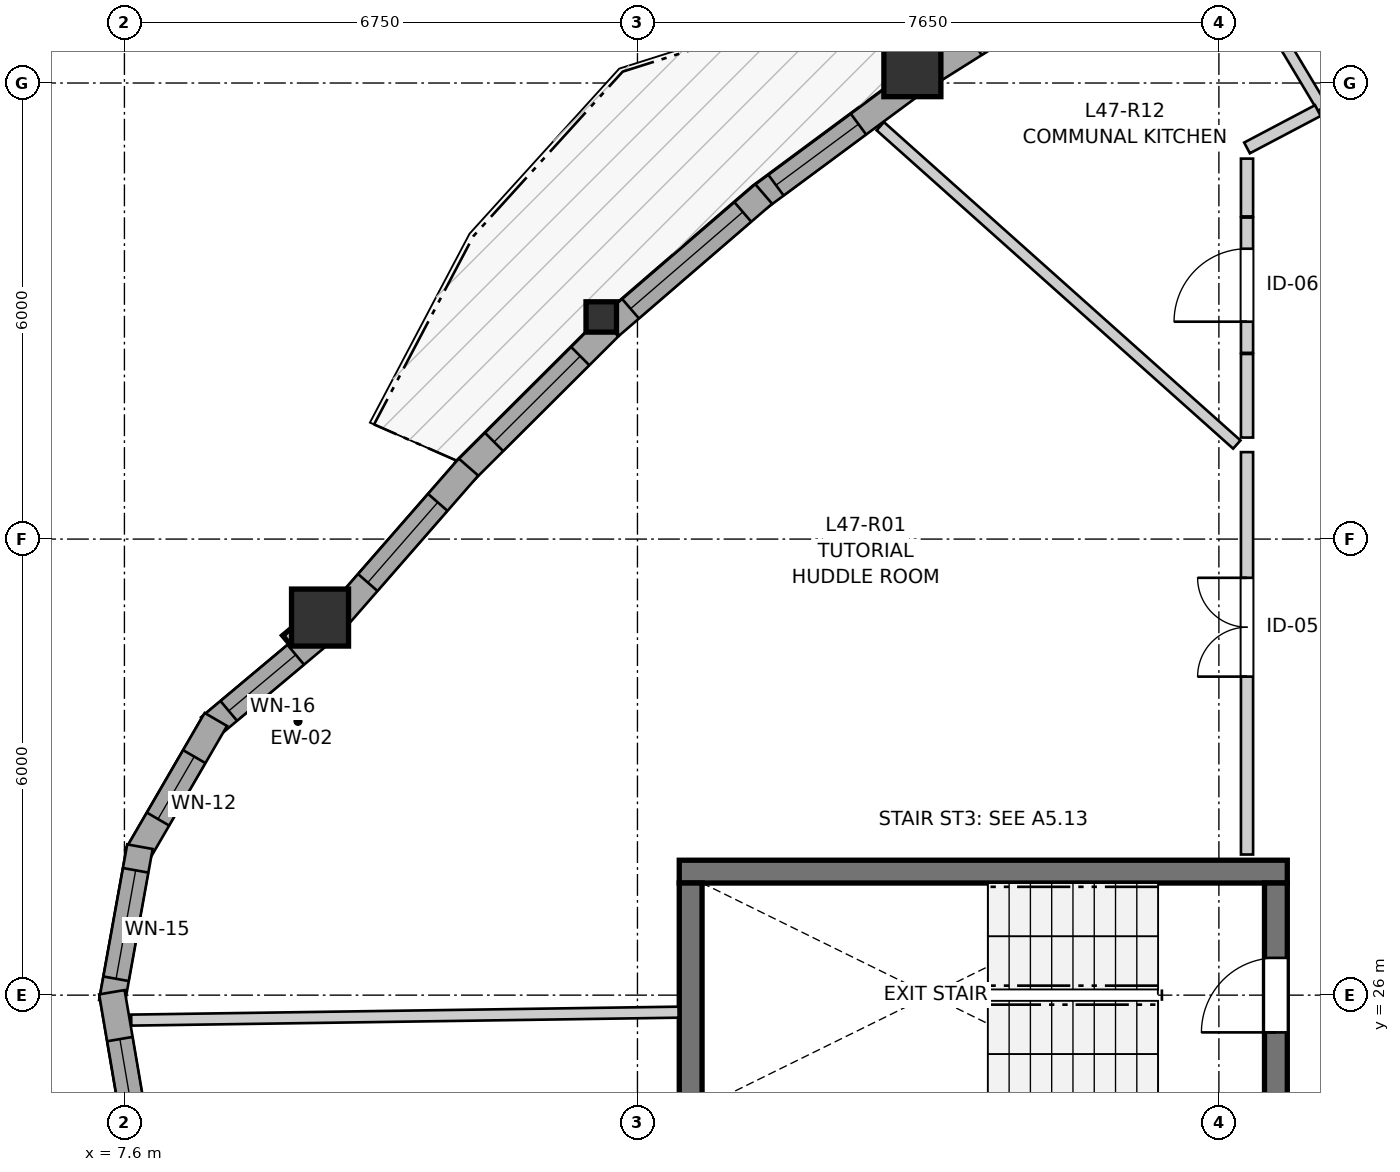
"""IFC4 building model, lengths in metres.
Left out: names, types, materials, properties, quantities, classifications, styles, units other than length and angle.
Written with IfcOpenShell. Run it as: python <this file> out.ifc"""

import sys

from ifc_helpers import new_model, si_unit, direction, frame, frame_2d, origin, origin_2d, place, context, subcontext, project, spatial, rectangle, i_section, extrude, source, transform, mapped, element, fill, save


model = new_model("IFC4")
c1 = context("Model", 3, precision=1e-05, world=origin(), true_north=direction((0.0, 1.0)))
c2 = subcontext(c1, "Body", "Model", "MODEL_VIEW")
j1 = project(units=[si_unit("LENGTHUNIT", "METRE"), si_unit("PLANEANGLEUNIT", "RADIAN")], contexts=[c1])
p1 = place(None, origin())
s1 = spatial("IfcSite", under=j1, at=p1, CompositionType="ELEMENT")
p2 = place(p1, origin())
s2 = spatial("IfcBuilding", under=s1, at=p2, CompositionType="ELEMENT")
p3 = place(p2, frame((0.0, 0.0, 158.6)))
s3 = spatial("IfcBuildingStorey", under=s2, at=p3, CompositionType="ELEMENT", Elevation=158.6)
p4 = place(p3, frame((22.9, 27.625, 0.0), z_axis=(0.0, 0.0, 1.0), x_axis=(-1.0, 0.0, 0.0)))
e1 = element("IfcWall", 1, at=p4, inside=s3, PredefinedType="SHEAR", context=c2, shape_type="SweptSolid", body=[
    extrude(rectangle(XDim=8.0, YDim=0.3, at=frame_2d((4.0, 0.0))), origin(), (0.0, 0.0, 1.0), 2.95),
])
p5 = place(p3, frame((15.05, 27.475, 0.0), z_axis=(0.0, 0.0, 1.0), x_axis=(0.0, -1.0, 0.0)))
e2 = element("IfcWall", 2, at=p5, inside=s3, PredefinedType="SHEAR", context=c2, shape_type="SweptSolid", body=[
    extrude(rectangle(XDim=2.95, YDim=0.3, at=frame_2d((1.475, 0.0))), origin(), (0.0, 0.0, 1.0), 2.95),
])
p6 = place(p3, frame((22.75, 24.525, 0.0), z_axis=(0.0, 0.0, 1.0), x_axis=(0.0, 1.0, 0.0)))
e3 = element("IfcWall", 3, at=p6, inside=s3, PredefinedType="SHEAR", context=c2, shape_type="SweptSolid", body=[
    extrude(rectangle(XDim=2.95, YDim=0.3, at=frame_2d((1.475, 0.0))), origin(), (0.0, 0.0, 1.0), 2.95),
])
p7 = place(p6, frame((0.985, 0.0, 0.0)))
e4 = element("IfcOpeningElement", 4, at=p7, cuts=e3, PredefinedType="OPENING", context=c2, shape_type="SweptSolid", body=[
    extrude(rectangle(XDim=0.98, YDim=2.15, at=frame_2d((0.49, 1.075))), frame((0.0, 0.16, 0.0), z_axis=(0.0, -1.0, 0.0), x_axis=(1.0, 0.0, 0.0)), (0.0, 0.0, 1.0), 0.32),
])
m1 = source(origin(), c2, "Body", "SweptSolid", [
    extrude(rectangle(XDim=0.75, YDim=0.75, at=origin_2d()), origin(), (0.0, 0.0, 1.0), 2.95),
])
for number, where, z_axis, x_axis in (
    (5, (10.174, 30.967, 0.0), (0.0, 0.0, 1.0), (1.0, 0.0, 0.0)),
    (6, (17.967, 38.195, 0.0), (0.0, 0.0, 1.0), (1.0, 0.0, 0.0)),
):
    element("IfcColumn", number, at=place(p3, frame(where, z_axis=z_axis, x_axis=x_axis)), inside=s3, PredefinedType="COLUMN", context=c2, shape_type="MappedRepresentation", body=[
        mapped(m1, transform((0.0, 0.0, 0.0), x_axis=(1.0, 0.0, 0.0), y_axis=(0.0, 1.0, 0.0), z_axis=(0.0, 0.0, 1.0), scale=1.0)),
    ])
m2 = source(origin(), c2, "Body", "SweptSolid", [
    extrude(i_section(OverallWidth=0.401, OverallDepth=0.399, WebThickness=0.023, FlangeThickness=0.036, FilletRadius=0.015, at=origin_2d()), origin(), (0.0, 0.0, 1.0), 2.95),
])
p8 = place(p3, frame((13.874, 34.922, 0.0), z_axis=(0.0, 0.0, 1.0), x_axis=(1.0, 0.0, 0.0)))
e7 = element("IfcColumn", 7, at=p8, inside=s3, PredefinedType="PILASTER", context=c2, shape_type="MappedRepresentation", body=[
    mapped(m2, transform((0.0, 0.0, 0.0), x_axis=(1.0, 0.0, 0.0), y_axis=(0.0, 1.0, 0.0), z_axis=(0.0, 0.0, 1.0), scale=1.0)),
])
p9 = place(p3, frame((10.164, 30.738, 0.0), z_axis=(0.0, 0.0, 1.0), x_axis=(-0.766501557267, -0.64224244854, 0.0)))
e8 = element("IfcWall", 8, at=p9, inside=s3, PredefinedType="SOLIDWALL", context=c2, shape_type="SweptSolid", body=[
    extrude(rectangle(XDim=1.888, YDim=0.34, at=frame_2d((0.944, 0.0))), origin(), (0.0, 0.0, 1.0), 2.53),
])
p10 = place(p9, frame((0.404, 0.0, 0.82)))
e9 = element("IfcOpeningElement", 9, at=p10, cuts=e8, PredefinedType="OPENING", context=c2, shape_type="SweptSolid", body=[
    extrude(rectangle(XDim=1.15, YDim=1.2, at=frame_2d((0.575, 0.6))), frame((0.0, 0.18, 0.0), z_axis=(0.0, -1.0, 0.0), x_axis=(1.0, 0.0, 0.0)), (0.0, 0.0, 1.0), 0.36),
])
p11 = place(p3, frame((8.803, 29.627, 0.0), z_axis=(0.0, 0.0, 1.0), x_axis=(-0.502090235641, -0.864815237651, 0.0)))
e10 = element("IfcWall", 10, at=p11, inside=s3, PredefinedType="SOLIDWALL", context=c2, shape_type="SweptSolid", body=[
    extrude(rectangle(XDim=2.081, YDim=0.34, at=frame_2d((1.041, 0.0))), origin(), (0.0, 0.0, 1.0), 2.53),
])
p12 = place(p11, frame((0.565, 0.0, 0.82)))
e11 = element("IfcOpeningElement", 11, at=p12, cuts=e10, PredefinedType="OPENING", context=c2, shape_type="SweptSolid", body=[
    extrude(rectangle(XDim=0.95, YDim=1.35, at=frame_2d((0.475, 0.675))), frame((0.0, 0.18, 0.0), z_axis=(0.0, -1.0, 0.0), x_axis=(1.0, 0.0, 0.0)), (0.0, 0.0, 1.0), 0.36),
])
p13 = place(p3, frame((7.804, 27.953, 0.0), z_axis=(0.0, 0.0, 1.0), x_axis=(-0.177605215389, -0.984101817632, 0.0)))
e12 = element("IfcWall", 12, at=p13, inside=s3, PredefinedType="SOLIDWALL", context=c2, shape_type="SweptSolid", body=[
    extrude(rectangle(XDim=2.081, YDim=0.34, at=frame_2d((1.041, 0.0))), origin(), (0.0, 0.0, 1.0), 2.53),
])
p14 = place(p13, frame((0.316, 0.0, 0.82)))
e13 = element("IfcOpeningElement", 13, at=p14, cuts=e12, PredefinedType="OPENING", context=c2, shape_type="SweptSolid", body=[
    extrude(rectangle(XDim=1.45, YDim=1.25, at=frame_2d((0.725, 0.625))), frame((0.0, 0.18, 0.0), z_axis=(0.0, -1.0, 0.0), x_axis=(1.0, 0.0, 0.0)), (0.0, 0.0, 1.0), 0.36),
])
p15 = place(p3, frame((7.435, 26.038, 0.0), z_axis=(0.0, 0.0, 1.0), x_axis=(0.168107405166, -0.985768685001, 0.0)))
e14 = element("IfcWall", 14, at=p15, inside=s3, PredefinedType="SOLIDWALL", context=c2, shape_type="SweptSolid", body=[
    extrude(rectangle(XDim=2.081, YDim=0.34, at=frame_2d((1.041, 0.0))), origin(), (0.0, 0.0, 1.0), 2.53),
])
p16 = place(p15, frame((0.625, 0.0, 0.82)))
e15 = element("IfcOpeningElement", 15, at=p16, cuts=e14, PredefinedType="OPENING", context=c2, shape_type="SweptSolid", body=[
    extrude(rectangle(XDim=1.15, YDim=1.2, at=frame_2d((0.575, 0.6))), frame((0.0, 0.18, 0.0), z_axis=(0.0, -1.0, 0.0), x_axis=(1.0, 0.0, 0.0)), (0.0, 0.0, 1.0), 0.36),
])
p17 = place(p3, frame((20.284, 39.452, 0.0), z_axis=(0.0, 0.0, 1.0), x_axis=(-0.846415587119, -0.532522913951, 0.0)))
e16 = element("IfcWall", 16, at=p17, inside=s3, PredefinedType="SOLIDWALL", context=c2, shape_type="SweptSolid", body=[
    extrude(rectangle(XDim=2.476, YDim=0.34, at=frame_2d((1.238, 0.0))), origin(), (0.0, 0.0, 1.0), 2.53),
])
p18 = place(p17, frame((0.718, 0.0, 0.82)))
e17 = element("IfcOpeningElement", 17, at=p18, cuts=e16, PredefinedType="OPENING", context=c2, shape_type="SweptSolid", body=[
    extrude(rectangle(XDim=1.05, YDim=1.45, at=frame_2d((0.525, 0.725))), frame((0.0, 0.18, 0.0), z_axis=(0.0, -1.0, 0.0), x_axis=(1.0, 0.0, 0.0)), (0.0, 0.0, 1.0), 0.36),
])
p19 = place(p3, frame((17.944, 37.967, 0.0), z_axis=(0.0, 0.0, 1.0), x_axis=(-0.803795025682, -0.594906342788, 0.0)))
e18 = element("IfcWall", 18, at=p19, inside=s3, PredefinedType="SOLIDWALL", context=c2, shape_type="SweptSolid", body=[
    extrude(rectangle(XDim=2.491, YDim=0.34, at=frame_2d((1.245, 0.0))), origin(), (0.0, 0.0, 1.0), 2.53),
])
p20 = place(p19, frame((0.853, 0.0, 0.82)))
e19 = element("IfcOpeningElement", 19, at=p20, cuts=e18, PredefinedType="OPENING", context=c2, shape_type="SweptSolid", body=[
    extrude(rectangle(XDim=1.35, YDim=1.45, at=frame_2d((0.675, 0.725))), frame((0.0, 0.18, 0.0), z_axis=(0.0, -1.0, 0.0), x_axis=(1.0, 0.0, 0.0)), (0.0, 0.0, 1.0), 0.36),
])
p21 = place(p3, frame((16.011, 36.54, 0.0), z_axis=(0.0, 0.0, 1.0), x_axis=(-0.757442887734, -0.652901425807, 0.0)))
e20 = element("IfcWall", 20, at=p21, inside=s3, PredefinedType="SOLIDWALL", context=c2, shape_type="SweptSolid", body=[
    extrude(rectangle(XDim=2.655, YDim=0.34, at=frame_2d((1.328, 0.0))), origin(), (0.0, 0.0, 1.0), 2.53),
])
p22 = place(p21, frame((0.363, 0.0, 0.82)))
e21 = element("IfcOpeningElement", 21, at=p22, cuts=e20, PredefinedType="OPENING", context=c2, shape_type="SweptSolid", body=[
    extrude(rectangle(XDim=1.95, YDim=1.4, at=frame_2d((0.975, 0.7))), frame((0.0, 0.18, 0.0), z_axis=(0.0, -1.0, 0.0), x_axis=(1.0, 0.0, 0.0)), (0.0, 0.0, 1.0), 0.36),
])
p23 = place(p3, frame((13.979, 34.788, 0.0), z_axis=(0.0, 0.0, 1.0), x_axis=(-0.708417113386, -0.705794016312, 0.0)))
e22 = element("IfcWall", 22, at=p23, inside=s3, PredefinedType="SOLIDWALL", context=c2, shape_type="SweptSolid", body=[
    extrude(rectangle(XDim=2.699, YDim=0.34, at=frame_2d((1.35, 0.0))), origin(), (0.0, 0.0, 1.0), 2.53),
])
p24 = place(p23, frame((0.54, 0.0, 0.82)))
e23 = element("IfcOpeningElement", 23, at=p24, cuts=e22, PredefinedType="OPENING", context=c2, shape_type="SweptSolid", body=[
    extrude(rectangle(XDim=1.6, YDim=1.35, at=frame_2d((0.8, 0.675))), frame((0.0, 0.18, 0.0), z_axis=(0.0, -1.0, 0.0), x_axis=(1.0, 0.0, 0.0)), (0.0, 0.0, 1.0), 0.36),
])
p25 = place(p3, frame((12.127, 32.947, 0.0), z_axis=(0.0, 0.0, 1.0), x_axis=(-0.657607305641, -0.753360890655, 0.0)))
e24 = element("IfcWall", 24, at=p25, inside=s3, PredefinedType="SOLIDWALL", context=c2, shape_type="SweptSolid", body=[
    extrude(rectangle(XDim=2.621, YDim=0.34, at=frame_2d((1.311, 0.0))), origin(), (0.0, 0.0, 1.0), 2.53),
])
p26 = place(p25, frame((0.615, 0.0, 0.82)))
e25 = element("IfcOpeningElement", 25, at=p26, cuts=e24, PredefinedType="OPENING", context=c2, shape_type="SweptSolid", body=[
    extrude(rectangle(XDim=1.4, YDim=1.35, at=frame_2d((0.7, 0.675))), frame((0.0, 0.18, 0.0), z_axis=(0.0, -1.0, 0.0), x_axis=(1.0, 0.0, 0.0)), (0.0, 0.0, 1.0), 0.36),
])
p27 = place(p3, frame((22.37, 27.85, 0.0), z_axis=(0.0, 0.0, 1.0), x_axis=(0.0, 1.0, 0.0)))
e26 = element("IfcWall", 26, at=p27, inside=s3, PredefinedType="PARTITIONING", context=c2, shape_type="SweptSolid", body=[
    extrude(rectangle(XDim=5.294, YDim=0.16, at=frame_2d((2.647, 0.0))), origin(), (0.0, 0.0, 1.0), 2.95),
])
p28 = place(p27, frame((2.341, 0.0, 0.0)))
e27 = element("IfcOpeningElement", 27, at=p28, cuts=e26, PredefinedType="OPENING", context=c2, shape_type="SweptSolid", body=[
    extrude(rectangle(XDim=1.3, YDim=2.1, at=frame_2d((0.65, 1.05))), frame((0.0, 0.09, 0.0), z_axis=(0.0, -1.0, 0.0), x_axis=(1.0, 0.0, 0.0)), (0.0, 0.0, 1.0), 0.18),
])
p29 = place(p3, frame((22.37, 34.45, 0.0), z_axis=(0.0, 0.0, 1.0), x_axis=(0.0, 1.0, 0.0)))
e28 = element("IfcWall", 28, at=p29, inside=s3, PredefinedType="PARTITIONING", context=c2, shape_type="SweptSolid", body=[
    extrude(rectangle(XDim=1.78, YDim=0.16, at=frame_2d((0.89, 0.0))), origin(), (0.0, 0.0, 1.0), 2.95),
])
p30 = place(p29, frame((0.41, 0.0, 0.0)))
e29 = element("IfcOpeningElement", 29, at=p30, cuts=e28, PredefinedType="OPENING", context=c2, shape_type="SweptSolid", body=[
    extrude(rectangle(XDim=0.96, YDim=2.1, at=frame_2d((0.48, 1.05))), frame((0.0, 0.09, 0.0), z_axis=(0.0, -1.0, 0.0), x_axis=(1.0, 0.0, 0.0)), (0.0, 0.0, 1.0), 0.18),
])
p31 = place(p3, frame((7.689, 25.671, 0.0), z_axis=(0.0, 0.0, 1.0), x_axis=(0.999894747293, 0.014508422953, 0.0)))
e30 = element("IfcWall", 30, at=p31, inside=s3, PredefinedType="PARTITIONING", context=c2, shape_type="SweptSolid", body=[
    extrude(rectangle(XDim=7.202, YDim=0.145, at=frame_2d((3.601, 0.0))), origin(), (0.0, 0.0, 1.0), 2.95),
])
p32 = place(p3, frame((17.545, 37.432, 0.0), z_axis=(0.0, 0.0, 1.0), x_axis=(0.745965905636, -0.665984134668, 0.0)))
e31 = element("IfcWall", 31, at=p32, inside=s3, PredefinedType="PARTITIONING", context=c2, shape_type="SweptSolid", body=[
    extrude(rectangle(XDim=6.288, YDim=0.145, at=frame_2d((3.144, 0.0))), origin(), (0.0, 0.0, 1.0), 2.95),
])
p33 = place(p3, frame((21.908, 40.1, 0.0), z_axis=(0.0, 0.0, 1.0), x_axis=(0.513582752497, -0.85804006686, 0.0)))
e32 = element("IfcWall", 32, at=p33, inside=s3, PredefinedType="PARTITIONING", context=c2, shape_type="SweptSolid", body=[
    extrude(rectangle(XDim=2.832, YDim=0.145, at=frame_2d((1.416, 0.0))), origin(), (0.0, 0.0, 1.0), 2.95),
])
p34 = place(p3, frame((22.37, 33.336, 0.0), z_axis=(0.0, 0.0, 1.0), x_axis=(0.0, 1.0, 0.0)))
e33 = element("IfcWall", 33, at=p34, inside=s3, PredefinedType="PARTITIONING", context=c2, shape_type="SweptSolid", body=[
    extrude(rectangle(XDim=1.099, YDim=0.16, at=frame_2d((0.55, 0.0))), origin(), (0.0, 0.0, 1.0), 2.95),
])
p35 = place(p3, frame((22.37, 37.146, 0.0), z_axis=(0.0, 0.0, 1.0), x_axis=(0.884530854714, 0.46648168995, 0.0)))
e34 = element("IfcWall", 34, at=p35, inside=s3, PredefinedType="PARTITIONING", context=c2, shape_type="SweptSolid", body=[
    extrude(rectangle(XDim=1.053, YDim=0.16, at=frame_2d((0.527, 0.0))), origin(), (0.0, 0.0, 1.0), 2.558),
])
p36 = place(p3, frame((22.37, 36.245, 0.0), z_axis=(0.0, 0.0, 1.0), x_axis=(0.0, 1.0, 0.0)))
e35 = element("IfcWall", 35, at=p36, inside=s3, PredefinedType="PARTITIONING", context=c2, shape_type="SweptSolid", body=[
    extrude(rectangle(XDim=0.76, YDim=0.16, at=frame_2d((0.38, 0.0))), origin(), (0.0, 0.0, 1.0), 2.95),
])
m3 = source(origin(), c2, "Body", "SweptSolid", [
    extrude(rectangle(XDim=1.15, YDim=1.2, at=frame_2d((0.575, 0.6))), frame((0.0, 0.03, 0.0), z_axis=(0.0, -1.0, 0.0), x_axis=(1.0, 0.0, 0.0)), (0.0, 0.0, 1.0), 0.06),
])
p37 = place(p10, origin())
e36 = element("IfcWindow", 36, at=p37, inside=s3, PartitioningType="SINGLE_PANEL", PredefinedType="WINDOW", context=c2, shape_type="MappedRepresentation", body=[
    mapped(m3, transform((0.0, 0.0, 0.0), x_axis=(1.0, 0.0, 0.0), y_axis=(0.0, 1.0, 0.0), z_axis=(0.0, 0.0, 1.0), scale=1.0)),
])
fill(e9, e36)
m4 = source(origin(), c2, "Body", "SweptSolid", [
    extrude(rectangle(XDim=0.95, YDim=1.35, at=frame_2d((0.475, 0.675))), frame((0.0, 0.03, 0.0), z_axis=(0.0, -1.0, 0.0), x_axis=(1.0, 0.0, 0.0)), (0.0, 0.0, 1.0), 0.06),
])
p38 = place(p12, origin())
e37 = element("IfcWindow", 37, at=p38, inside=s3, PartitioningType="SINGLE_PANEL", PredefinedType="WINDOW", context=c2, shape_type="MappedRepresentation", body=[
    mapped(m4, transform((0.0, 0.0, 0.0), x_axis=(1.0, 0.0, 0.0), y_axis=(0.0, 1.0, 0.0), z_axis=(0.0, 0.0, 1.0), scale=1.0)),
])
fill(e11, e37)
m5 = source(origin(), c2, "Body", "SweptSolid", [
    extrude(rectangle(XDim=1.45, YDim=1.25, at=frame_2d((0.725, 0.625))), frame((0.0, 0.03, 0.0), z_axis=(0.0, -1.0, 0.0), x_axis=(1.0, 0.0, 0.0)), (0.0, 0.0, 1.0), 0.06),
])
p39 = place(p14, origin())
e38 = element("IfcWindow", 38, at=p39, inside=s3, PartitioningType="SINGLE_PANEL", PredefinedType="WINDOW", context=c2, shape_type="MappedRepresentation", body=[
    mapped(m5, transform((0.0, 0.0, 0.0), x_axis=(1.0, 0.0, 0.0), y_axis=(0.0, 1.0, 0.0), z_axis=(0.0, 0.0, 1.0), scale=1.0)),
])
fill(e13, e38)
p40 = place(p16, origin())
e39 = element("IfcWindow", 39, at=p40, inside=s3, PartitioningType="SINGLE_PANEL", PredefinedType="WINDOW", context=c2, shape_type="MappedRepresentation", body=[
    mapped(m3, transform((0.0, 0.0, 0.0), x_axis=(1.0, 0.0, 0.0), y_axis=(0.0, 1.0, 0.0), z_axis=(0.0, 0.0, 1.0), scale=1.0)),
])
fill(e15, e39)
m6 = source(origin(), c2, "Body", "SweptSolid", [
    extrude(rectangle(XDim=1.35, YDim=1.45, at=frame_2d((0.675, 0.725))), frame((0.0, 0.03, 0.0), z_axis=(0.0, -1.0, 0.0), x_axis=(1.0, 0.0, 0.0)), (0.0, 0.0, 1.0), 0.06),
])
p41 = place(p20, origin())
e40 = element("IfcWindow", 40, at=p41, inside=s3, PartitioningType="SINGLE_PANEL", PredefinedType="WINDOW", context=c2, shape_type="MappedRepresentation", body=[
    mapped(m6, transform((0.0, 0.0, 0.0), x_axis=(1.0, 0.0, 0.0), y_axis=(0.0, 1.0, 0.0), z_axis=(0.0, 0.0, 1.0), scale=1.0)),
])
fill(e19, e40)
m7 = source(origin(), c2, "Body", "SweptSolid", [
    extrude(rectangle(XDim=1.95, YDim=1.4, at=frame_2d((0.975, 0.7))), frame((0.0, 0.03, 0.0), z_axis=(0.0, -1.0, 0.0), x_axis=(1.0, 0.0, 0.0)), (0.0, 0.0, 1.0), 0.06),
])
p42 = place(p22, origin())
e41 = element("IfcWindow", 41, at=p42, inside=s3, PartitioningType="SINGLE_PANEL", PredefinedType="WINDOW", context=c2, shape_type="MappedRepresentation", body=[
    mapped(m7, transform((0.0, 0.0, 0.0), x_axis=(1.0, 0.0, 0.0), y_axis=(0.0, 1.0, 0.0), z_axis=(0.0, 0.0, 1.0), scale=1.0)),
])
fill(e21, e41)
m8 = source(origin(), c2, "Body", "SweptSolid", [
    extrude(rectangle(XDim=1.6, YDim=1.35, at=frame_2d((0.8, 0.675))), frame((0.0, 0.03, 0.0), z_axis=(0.0, -1.0, 0.0), x_axis=(1.0, 0.0, 0.0)), (0.0, 0.0, 1.0), 0.06),
])
p43 = place(p24, origin())
e42 = element("IfcWindow", 42, at=p43, inside=s3, PartitioningType="SINGLE_PANEL", PredefinedType="WINDOW", context=c2, shape_type="MappedRepresentation", body=[
    mapped(m8, transform((0.0, 0.0, 0.0), x_axis=(1.0, 0.0, 0.0), y_axis=(0.0, 1.0, 0.0), z_axis=(0.0, 0.0, 1.0), scale=1.0)),
])
fill(e23, e42)
m9 = source(origin(), c2, "Body", "SweptSolid", [
    extrude(rectangle(XDim=1.4, YDim=1.35, at=frame_2d((0.7, 0.675))), frame((0.0, 0.03, 0.0), z_axis=(0.0, -1.0, 0.0), x_axis=(1.0, 0.0, 0.0)), (0.0, 0.0, 1.0), 0.06),
])
p44 = place(p26, origin())
e43 = element("IfcWindow", 43, at=p44, inside=s3, PartitioningType="SINGLE_PANEL", PredefinedType="WINDOW", context=c2, shape_type="MappedRepresentation", body=[
    mapped(m9, transform((0.0, 0.0, 0.0), x_axis=(1.0, 0.0, 0.0), y_axis=(0.0, 1.0, 0.0), z_axis=(0.0, 0.0, 1.0), scale=1.0)),
])
fill(e25, e43)
m10 = source(origin(), c2, "Body", "SweptSolid", [
    extrude(rectangle(XDim=0.98, YDim=2.15, at=frame_2d((0.49, 1.075))), frame((0.0, 0.025, 0.0), z_axis=(0.0, -1.0, 0.0), x_axis=(1.0, 0.0, 0.0)), (0.0, 0.0, 1.0), 0.05),
])
p45 = place(p7, origin())
e44 = element("IfcDoor", 44, at=p45, inside=s3, OperationType="SINGLE_SWING_LEFT", PredefinedType="DOOR", context=c2, shape_type="MappedRepresentation", body=[
    mapped(m10, transform((0.0, 0.0, 0.0), x_axis=(1.0, 0.0, 0.0), y_axis=(0.0, 1.0, 0.0), z_axis=(0.0, 0.0, 1.0), scale=1.0)),
])
fill(e4, e44)
m11 = source(origin(), c2, "Body", "SweptSolid", [
    extrude(rectangle(XDim=1.3, YDim=2.1, at=frame_2d((0.65, 1.05))), frame((0.0, 0.025, 0.0), z_axis=(0.0, -1.0, 0.0), x_axis=(1.0, 0.0, 0.0)), (0.0, 0.0, 1.0), 0.05),
])
p46 = place(p28, origin())
e45 = element("IfcDoor", 45, at=p46, inside=s3, OperationType="DOUBLE_DOOR_SINGLE_SWING", PredefinedType="DOOR", context=c2, shape_type="MappedRepresentation", body=[
    mapped(m11, transform((0.0, 0.0, 0.0), x_axis=(1.0, 0.0, 0.0), y_axis=(0.0, 1.0, 0.0), z_axis=(0.0, 0.0, 1.0), scale=1.0)),
])
fill(e27, e45)
m12 = source(origin(), c2, "Body", "SweptSolid", [
    extrude(rectangle(XDim=0.96, YDim=2.1, at=frame_2d((0.48, 1.05))), frame((0.0, 0.025, 0.0), z_axis=(0.0, -1.0, 0.0), x_axis=(1.0, 0.0, 0.0)), (0.0, 0.0, 1.0), 0.05),
])
p47 = place(p30, origin())
e46 = element("IfcDoor", 46, at=p47, inside=s3, OperationType="SINGLE_SWING_LEFT", PredefinedType="DOOR", context=c2, shape_type="MappedRepresentation", body=[
    mapped(m12, transform((0.0, 0.0, 0.0), x_axis=(1.0, 0.0, 0.0), y_axis=(0.0, 1.0, 0.0), z_axis=(0.0, 0.0, 1.0), scale=1.0)),
])
fill(e29, e46)
save(model, sys.argv[1])
